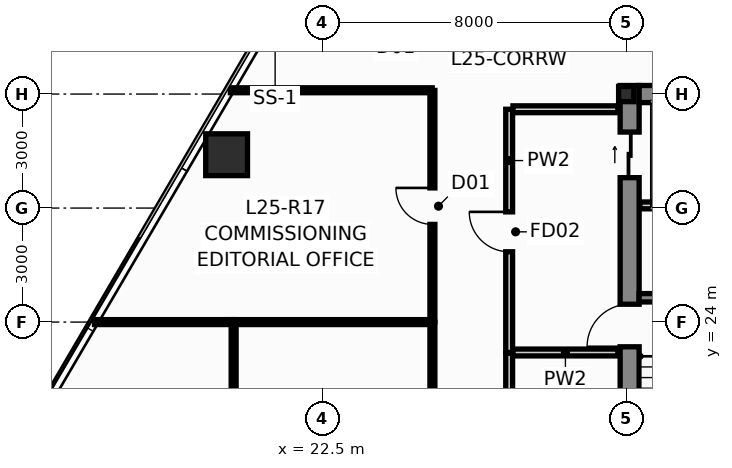
"""IFC4 building model, lengths in metres.
Left out: names, types, materials, properties, quantities, classifications, styles, units other than length and angle.
Written with IfcOpenShell. Run it as: python <this file> out.ifc"""

import sys

from ifc_helpers import new_model, si_unit, direction, frame, frame_2d, origin, origin_2d, place, context, subcontext, project, spatial, rectangle, hollow_rectangle, i_section, extrude, source, transform, mapped, element, fill, save


model = new_model("IFC4")
c1 = context("Model", 3, precision=1e-05, world=origin(), true_north=direction((0.0, 1.0)))
c2 = subcontext(c1, "Body", "Model", "MODEL_VIEW")
j1 = project(units=[si_unit("LENGTHUNIT", "METRE"), si_unit("PLANEANGLEUNIT", "RADIAN")], contexts=[c1])
p1 = place(None, origin())
s1 = spatial("IfcSite", under=j1, at=p1, CompositionType="ELEMENT")
p2 = place(p1, origin())
s2 = spatial("IfcBuilding", under=s1, at=p2, CompositionType="ELEMENT")
p3 = place(p2, frame((0.0, 0.0, 98.1)))
s3 = spatial("IfcBuildingStorey", under=s2, at=p3, CompositionType="ELEMENT", Elevation=98.1)
m1 = source(origin(), c2, "Body", "SweptSolid", [
    extrude(i_section(OverallWidth=0.4, OverallDepth=0.4, WebThickness=0.02, FlangeThickness=0.032, at=origin_2d()), origin(), (0.0, 0.0, 1.0), 3.65),
])
p4 = place(p3, frame((30.5, 30.0, 0.0), z_axis=(0.0, 0.0, 1.0), x_axis=(1.0, 0.0, 0.0)))
e1 = element("IfcColumn", 1, at=p4, inside=s3, PredefinedType="COLUMN", context=c2, shape_type="MappedRepresentation", body=[
    mapped(m1, transform((0.0, 0.0, 0.0), scale=1.0)),
])
p5 = place(p3, frame((30.59, 16.95, 0.0), z_axis=(0.0, 0.0, 1.0), x_axis=(0.0, 1.0, 0.0)))
e2 = element("IfcWall", 2, at=p5, inside=s3, PredefinedType="SHEAR", context=c2, shape_type="SweptSolid", body=[
    extrude(rectangle(XDim=13.275, YDim=0.5, at=frame_2d((6.638, 0.0))), origin(), (0.0, 0.0, 1.0), 3.65),
])
p6 = place(p5, frame((6.4, 0.0, 0.0)))
e3 = element("IfcOpeningElement", 3, at=p6, cuts=e2, PredefinedType="OPENING", context=c2, shape_type="SweptSolid", body=[
    extrude(rectangle(XDim=1.12, YDim=2.15, at=frame_2d((0.56, 1.075))), frame((0.0, 0.262, 0.0), z_axis=(0.0, -1.0, 0.0), x_axis=(1.0, 0.0, 0.0)), (0.0, 0.0, 1.0), 0.524),
])
p7 = place(p5, frame((10.85, 0.0, 0.0)))
e4 = element("IfcOpeningElement", 4, at=p7, cuts=e2, PredefinedType="OPENING", context=c2, shape_type="SweptSolid", body=[
    extrude(rectangle(XDim=1.2, YDim=2.2, at=frame_2d((0.6, 1.1))), frame((0.0, 0.262, 0.0), z_axis=(0.0, -1.0, 0.0), x_axis=(1.0, 0.0, 0.0)), (0.0, 0.0, 1.0), 0.524),
])
p8 = place(p3, frame((30.84, 30.0, 0.0), z_axis=(0.0, 0.0, 1.0), x_axis=(1.0, 0.0, 0.0)))
e5 = element("IfcWall", 5, at=p8, inside=s3, PredefinedType="SHEAR", context=c2, shape_type="SweptSolid", body=[
    extrude(rectangle(XDim=2.9, YDim=0.45, at=frame_2d((1.45, 0.0))), origin(), (0.0, 0.0, 1.0), 3.65),
])
p9 = place(p3, frame((30.84, 24.64, 0.0), z_axis=(0.0, 0.0, 1.0), x_axis=(1.0, 0.0, 0.0)))
e6 = element("IfcWall", 6, at=p9, inside=s3, PredefinedType="SHEAR", context=c2, shape_type="SweptSolid", body=[
    extrude(rectangle(XDim=2.9, YDim=0.22, at=frame_2d((1.45, 0.0))), origin(), (0.0, 0.0, 1.0), 3.65),
])
m2 = source(origin(), c2, "Body", "SweptSolid", [
    extrude(hollow_rectangle(XDim=1.1, YDim=1.1, WallThickness=0.06, at=origin_2d()), origin(), (0.0, 0.0, 1.0), 3.651),
])
p10 = place(p3, frame((19.985, 28.404, 0.0), z_axis=(0.014913313399, -0.013776424037, 0.999793880369), x_axis=(0.678553674548, 0.734550822447, 0.0)))
e7 = element("IfcColumn", 7, at=p10, inside=s3, PredefinedType="COLUMN", context=c2, shape_type="MappedRepresentation", body=[
    mapped(m2, transform((0.0, 0.0, 0.0), scale=1.0)),
])
p11 = place(p3, frame((27.42, 23.2, 0.0), z_axis=(0.0, 0.0, 1.0), x_axis=(0.0, 1.0, 0.0)))
e8 = element("IfcWall", 8, at=p11, inside=s3, PredefinedType="PARTITIONING", context=c2, shape_type="SweptSolid", body=[
    extrude(rectangle(XDim=6.4, YDim=0.18, at=frame_2d((3.2, 0.0))), origin(), (0.0, 0.0, 1.0), 3.026),
])
p12 = place(p11, frame((2.65, 0.0, 0.0)))
e9 = element("IfcOpeningElement", 9, at=p12, cuts=e8, PredefinedType="OPENING", context=c2, shape_type="SweptSolid", body=[
    extrude(rectangle(XDim=1.05, YDim=2.15, at=frame_2d((0.525, 1.075))), frame((0.0, 0.102, 0.0), z_axis=(0.0, -1.0, 0.0), x_axis=(1.0, 0.0, 0.0)), (0.0, 0.0, 1.0), 0.204),
])
p13 = place(p3, frame((27.52, 23.2, 0.0), z_axis=(0.0, 0.0, 1.0), x_axis=(1.0, 0.0, 0.0)))
e10 = element("IfcWall", 10, at=p13, inside=s3, PredefinedType="PARTITIONING", context=c2, shape_type="SweptSolid", body=[
    extrude(rectangle(XDim=2.76, YDim=0.18, at=frame_2d((1.38, 0.0))), origin(), (0.0, 0.0, 1.0), 3.4),
])
p14 = place(p3, frame((27.52, 29.6, 0.0), z_axis=(0.0, 0.0, 1.0), x_axis=(1.0, 0.0, 0.0)))
e11 = element("IfcWall", 11, at=p14, inside=s3, PredefinedType="PARTITIONING", context=c2, shape_type="SweptSolid", body=[
    extrude(rectangle(XDim=2.76, YDim=0.18, at=frame_2d((1.38, 0.0))), origin(), (0.0, 0.0, 1.0), 2.783),
])
p15 = place(p3, frame((30.86, 27.07, 0.0), z_axis=(0.0, 0.0, 1.0), x_axis=(1.0, 0.0, 0.0)))
e12 = element("IfcWall", 12, at=p15, inside=s3, PredefinedType="PARTITIONING", context=c2, shape_type="SweptSolid", body=[
    extrude(rectangle(XDim=2.9, YDim=0.18, at=frame_2d((1.45, 0.0))), origin(), (0.0, 0.0, 1.0), 3.4),
])
p16 = place(p3, frame((27.42, 17.15, 0.0), z_axis=(0.0, 0.0, 1.0), x_axis=(0.0, 1.0, 0.0)))
e13 = element("IfcWall", 13, at=p16, inside=s3, PredefinedType="PARTITIONING", context=c2, shape_type="SweptSolid", body=[
    extrude(rectangle(XDim=6.03, YDim=0.18, at=frame_2d((3.015, 0.0))), origin(), (0.0, 0.0, 1.0), 3.4),
])
p17 = place(p16, frame((2.45, 0.0, 0.0)))
e14 = element("IfcOpeningElement", 14, at=p17, cuts=e13, PredefinedType="OPENING", context=c2, shape_type="SweptSolid", body=[
    extrude(rectangle(XDim=1.05, YDim=2.15, at=frame_2d((0.525, 1.075))), frame((0.0, 0.102, 0.0), z_axis=(0.0, -1.0, 0.0), x_axis=(1.0, 0.0, 0.0)), (0.0, 0.0, 1.0), 0.204),
])
p18 = place(p3, frame((25.4, 17.105, 0.0), z_axis=(0.0, 0.0, 1.0), x_axis=(0.0, 1.0, 0.0)))
e15 = element("IfcWall", 15, at=p18, inside=s3, PredefinedType="PARTITIONING", context=c2, shape_type="SweptSolid", body=[
    extrude(rectangle(XDim=6.89, YDim=0.13, at=frame_2d((3.445, 0.0))), origin(), (0.0, 0.0, 1.0), 3.026),
])
p19 = place(p18, frame((2.965, 0.0, 0.0)))
e16 = element("IfcOpeningElement", 16, at=p19, cuts=e15, PredefinedType="OPENING", context=c2, shape_type="SweptSolid", body=[
    extrude(rectangle(XDim=0.96, YDim=2.15, at=frame_2d((0.48, 1.075))), frame((0.0, 0.077, 0.0), z_axis=(0.0, -1.0, 0.0), x_axis=(1.0, 0.0, 0.0)), (0.0, 0.0, 1.0), 0.154),
])
p20 = place(p3, frame((20.17, 17.105, 0.0), z_axis=(0.0, 0.0, 1.0), x_axis=(0.0, 1.0, 0.0)))
e17 = element("IfcWall", 17, at=p20, inside=s3, PredefinedType="PARTITIONING", context=c2, shape_type="SweptSolid", body=[
    extrude(rectangle(XDim=6.89, YDim=0.13, at=frame_2d((3.445, 0.0))), origin(), (0.0, 0.0, 1.0), 3.026),
])
p21 = place(p3, frame((25.4, 24.005, 0.0), z_axis=(0.0, 0.0, 1.0), x_axis=(0.0, 1.0, 0.0)))
e18 = element("IfcWall", 18, at=p21, inside=s3, PredefinedType="PARTITIONING", context=c2, shape_type="SweptSolid", body=[
    extrude(rectangle(XDim=6.09, YDim=0.13, at=frame_2d((3.045, 0.0))), origin(), (0.0, 0.0, 1.0), 3.026),
])
p22 = place(p21, frame((2.565, 0.0, 0.0)))
e19 = element("IfcOpeningElement", 19, at=p22, cuts=e18, PredefinedType="OPENING", context=c2, shape_type="SweptSolid", body=[
    extrude(rectangle(XDim=0.96, YDim=2.15, at=frame_2d((0.48, 1.075))), frame((0.0, 0.077, 0.0), z_axis=(0.0, -1.0, 0.0), x_axis=(1.0, 0.0, 0.0)), (0.0, 0.0, 1.0), 0.154),
])
p23 = place(p3, frame((25.395, 30.1, 0.0), z_axis=(0.0, 0.0, 1.0), x_axis=(-1.0, 0.0, 0.0)))
e20 = element("IfcWall", 20, at=p23, inside=s3, PredefinedType="PARTITIONING", context=c2, shape_type="SweptSolid", body=[
    extrude(rectangle(XDim=5.312, YDim=0.13, at=frame_2d((2.656, 0.0))), origin(), (0.0, 0.0, 1.0), 3.4),
])
p24 = place(p3, frame((20.175, 24.0, 0.0), z_axis=(0.0, 0.0, 1.0), x_axis=(1.0, 0.0, 0.0)))
e21 = element("IfcWall", 21, at=p24, inside=s3, PredefinedType="PARTITIONING", context=c2, shape_type="SweptSolid", body=[
    extrude(rectangle(XDim=5.22, YDim=0.13, at=frame_2d((2.61, 0.0))), origin(), (0.0, 0.0, 1.0), 3.4),
])
p25 = place(p3, frame((16.509, 24.0, 0.0), z_axis=(0.0, 0.0, 1.0), x_axis=(1.0, 0.0, 0.0)))
e22 = element("IfcWall", 22, at=p25, inside=s3, PredefinedType="PARTITIONING", context=c2, shape_type="SweptSolid", body=[
    extrude(rectangle(XDim=3.656, YDim=0.13, at=frame_2d((1.828, 0.0))), origin(), (0.0, 0.0, 1.0), 3.4),
])
p26 = place(p6, origin())
e23 = element("IfcDoor", 23, at=p26, inside=s3, OperationType="SINGLE_SWING_LEFT", PredefinedType="DOOR", context=c2, shape_type="SweptSolid", body=[
    extrude(rectangle(XDim=1.12, YDim=2.15, at=frame_2d((0.56, 1.075))), frame((0.0, 0.025, 0.0), z_axis=(0.0, -1.0, 0.0), x_axis=(1.0, 0.0, 0.0)), (0.0, 0.0, 1.0), 0.05),
])
fill(e3, e23)
p27 = place(p7, origin())
e24 = element("IfcDoor", 24, at=p27, inside=s3, OperationType="SLIDING_TO_LEFT", PredefinedType="DOOR", context=c2, shape_type="SweptSolid", body=[
    extrude(rectangle(XDim=1.2, YDim=2.2, at=frame_2d((0.6, 1.1))), frame((0.0, 0.025, 0.0), z_axis=(0.0, -1.0, 0.0), x_axis=(1.0, 0.0, 0.0)), (0.0, 0.0, 1.0), 0.05),
])
fill(e4, e24)
p28 = place(p12, origin())
e25 = element("IfcDoor", 25, at=p28, inside=s3, OperationType="SINGLE_SWING_RIGHT", PredefinedType="DOOR", context=c2, shape_type="SweptSolid", body=[
    extrude(rectangle(XDim=1.05, YDim=2.15, at=frame_2d((0.525, 1.075))), frame((0.0, 0.025, 0.0), z_axis=(0.0, -1.0, 0.0), x_axis=(1.0, 0.0, 0.0)), (0.0, 0.0, 1.0), 0.05),
])
fill(e9, e25)
p29 = place(p22, origin())
e26 = element("IfcDoor", 26, at=p29, inside=s3, OperationType="SINGLE_SWING_RIGHT", PredefinedType="DOOR", context=c2, shape_type="SweptSolid", body=[
    extrude(rectangle(XDim=0.96, YDim=2.15, at=frame_2d((0.48, 1.075))), frame((0.0, 0.025, 0.0), z_axis=(0.0, -1.0, 0.0), x_axis=(1.0, 0.0, 0.0)), (0.0, 0.0, 1.0), 0.05),
])
fill(e19, e26)
save(model, sys.argv[1])
